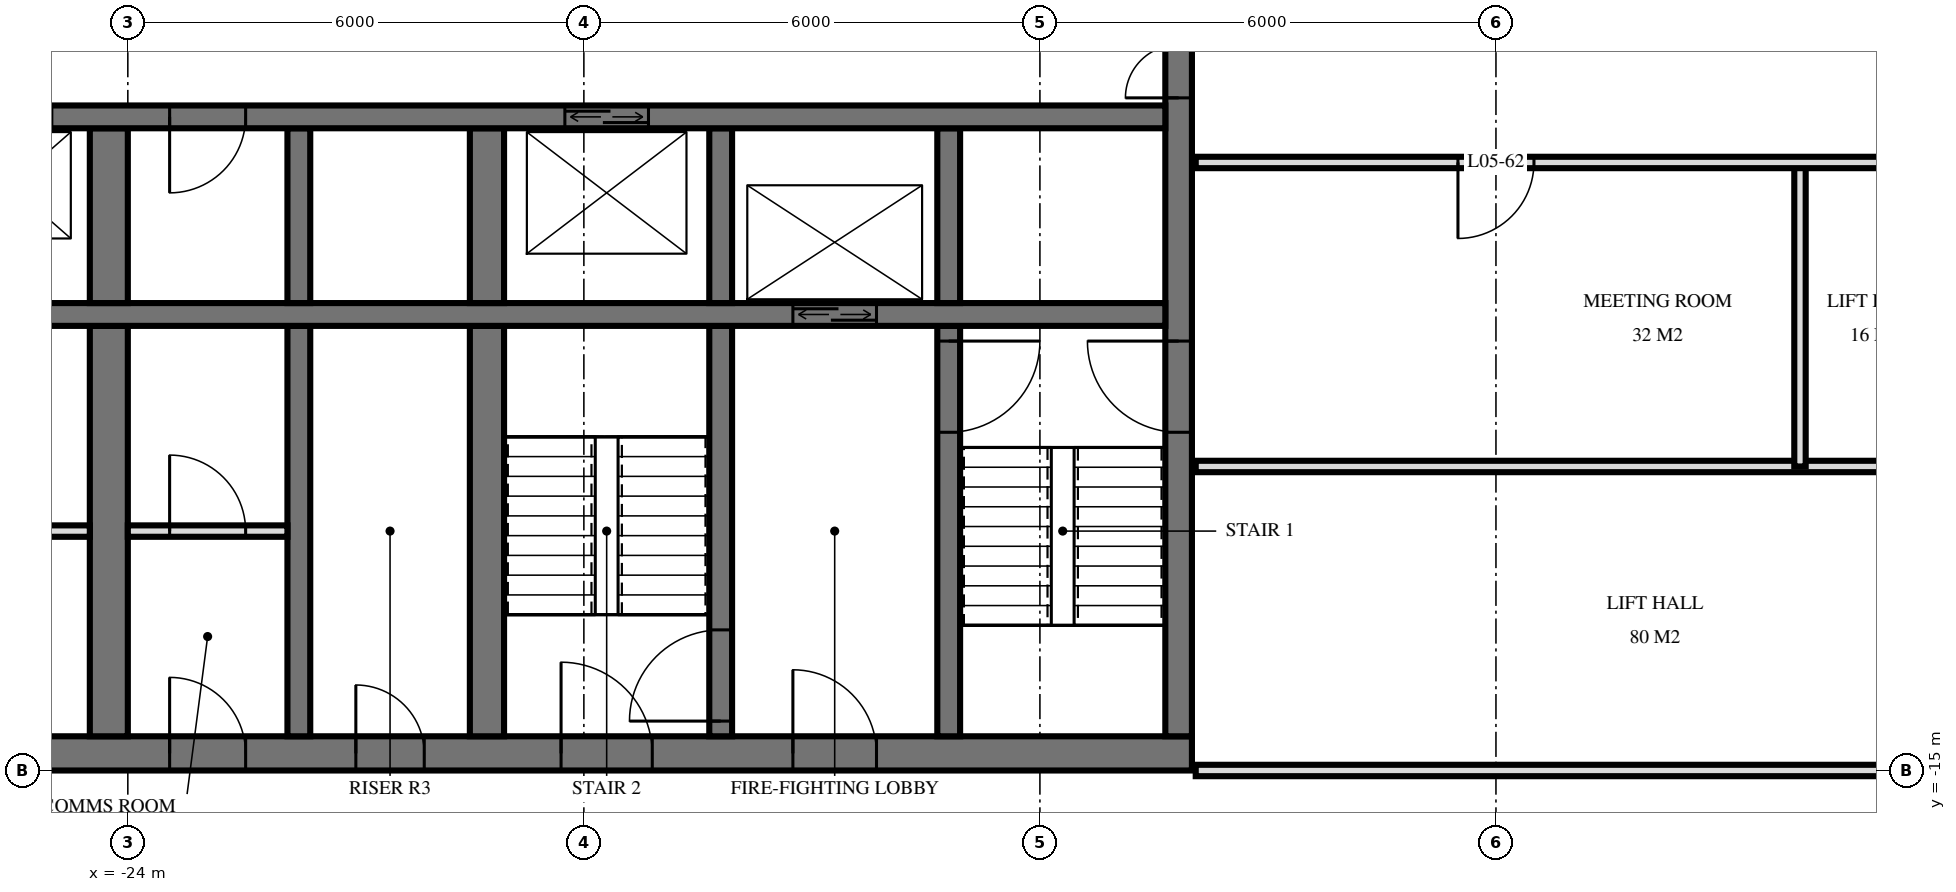
"""IFC4 building model, lengths in metres.
Left out: names, types, materials, properties, quantities, classifications, styles, units other than length and angle.
Written with IfcOpenShell. Run it as: python <this file> out.ifc"""

import sys

from ifc_helpers import new_model, si_unit, direction, frame, frame_2d, origin, place, context, subcontext, project, spatial, rectangle, extrude, element, fill, save


model = new_model("IFC4")
c1 = context("Model", 3, precision=1e-05, world=origin(), true_north=direction((0.0, 1.0)))
c2 = subcontext(c1, "Body", "Model", "MODEL_VIEW")
j1 = project(units=[si_unit("LENGTHUNIT", "METRE"), si_unit("PLANEANGLEUNIT", "RADIAN")], contexts=[c1])
p1 = place(None, origin())
s1 = spatial("IfcSite", under=j1, at=p1, CompositionType="ELEMENT")
p2 = place(p1, origin())
s2 = spatial("IfcBuilding", under=s1, at=p2, CompositionType="ELEMENT")
p3 = place(p2, frame((0.0, 0.0, 27.6)))
s3 = spatial("IfcBuildingStorey", under=s2, at=p3, CompositionType="ELEMENT", Elevation=27.6)
p4 = place(p3, frame((-29.5, -14.775, 0.0), z_axis=(0.0, 0.0, 1.0), x_axis=(1.0, 0.0, 0.0)))
e1 = element("IfcWall", 1, at=p4, inside=s3, PredefinedType="SHEAR", context=c2, shape_type="SweptSolid", body=[
    extrude(rectangle(XDim=19.5, YDim=0.45, at=frame_2d((9.75, 0.0))), origin(), (0.0, 0.0, 1.0), 3.6),
])
p5 = place(p4, frame((11.2, 0.0, 0.0)))
e2 = element("IfcOpeningElement", 2, at=p5, cuts=e1, PredefinedType="OPENING", context=c2, shape_type="SweptSolid", body=[
    extrude(rectangle(XDim=1.2, YDim=2.1, at=frame_2d((0.6, 1.05))), frame((0.0, 0.235, 0.0), z_axis=(0.0, -1.0, 0.0), x_axis=(1.0, 0.0, 0.0)), (0.0, 0.0, 1.0), 0.47),
])
p6 = place(p4, frame((14.25, 0.0, 0.0)))
e3 = element("IfcOpeningElement", 3, at=p6, cuts=e1, PredefinedType="OPENING", context=c2, shape_type="SweptSolid", body=[
    extrude(rectangle(XDim=1.1, YDim=2.1, at=frame_2d((0.55, 1.05))), frame((0.0, 0.235, 0.0), z_axis=(0.0, -1.0, 0.0), x_axis=(1.0, 0.0, 0.0)), (0.0, 0.0, 1.0), 0.47),
])
p7 = place(p4, frame((8.5, 0.0, 0.0)))
e4 = element("IfcOpeningElement", 4, at=p7, cuts=e1, PredefinedType="OPENING", context=c2, shape_type="SweptSolid", body=[
    extrude(rectangle(XDim=0.9, YDim=2.1, at=frame_2d((0.45, 1.05))), frame((0.0, 0.235, 0.0), z_axis=(0.0, -1.0, 0.0), x_axis=(1.0, 0.0, 0.0)), (0.0, 0.0, 1.0), 0.47),
])
p8 = place(p4, frame((6.05, 0.0, 0.0)))
e5 = element("IfcOpeningElement", 5, at=p8, cuts=e1, PredefinedType="OPENING", context=c2, shape_type="SweptSolid", body=[
    extrude(rectangle(XDim=1.0, YDim=2.1, at=frame_2d((0.5, 1.05))), frame((0.0, 0.235, 0.0), z_axis=(0.0, -1.0, 0.0), x_axis=(1.0, 0.0, 0.0)), (0.0, 0.0, 1.0), 0.47),
])
p9 = place(p4, frame((2.25, 0.0, 0.0)))
e6 = element("IfcOpeningElement", 6, at=p9, cuts=e1, PredefinedType="OPENING", context=c2, shape_type="SweptSolid", body=[
    extrude(rectangle(XDim=1.0, YDim=2.1, at=frame_2d((0.5, 1.05))), frame((0.0, 0.235, 0.0), z_axis=(0.0, -1.0, 0.0), x_axis=(1.0, 0.0, 0.0)), (0.0, 0.0, 1.0), 0.47),
])
p10 = place(p3, frame((-10.175, -14.55, 0.0), z_axis=(0.0, 0.0, 1.0), x_axis=(0.0, 1.0, 0.0)))
e7 = element("IfcWall", 7, at=p10, inside=s3, PredefinedType="SHEAR", context=c2, shape_type="SweptSolid", body=[
    extrude(rectangle(XDim=14.1, YDim=0.35, at=frame_2d((7.05, 0.0))), origin(), (0.0, 0.0, 1.0), 3.6),
])
p11 = place(p10, frame((8.4, 0.0, 0.0)))
e8 = element("IfcOpeningElement", 8, at=p11, cuts=e7, PredefinedType="OPENING", context=c2, shape_type="SweptSolid", body=[
    extrude(rectangle(XDim=1.4, YDim=2.4, at=frame_2d((0.7, 1.2))), frame((0.0, 0.185, 0.0), z_axis=(0.0, -1.0, 0.0), x_axis=(1.0, 0.0, 0.0)), (0.0, 0.0, 1.0), 0.37),
])
p12 = place(p10, frame((10.0, 0.0, 0.0)))
e9 = element("IfcOpeningElement", 9, at=p12, cuts=e7, PredefinedType="OPENING", context=c2, shape_type="SweptSolid", body=[
    extrude(rectangle(XDim=1.4, YDim=2.4, at=frame_2d((0.7, 1.2))), frame((0.0, 0.185, 0.0), z_axis=(0.0, -1.0, 0.0), x_axis=(1.0, 0.0, 0.0)), (0.0, 0.0, 1.0), 0.37),
])
p13 = place(p10, frame((4.0, 0.0, 0.0)))
e10 = element("IfcOpeningElement", 10, at=p13, cuts=e7, PredefinedType="OPENING", context=c2, shape_type="SweptSolid", body=[
    extrude(rectangle(XDim=1.2, YDim=2.1, at=frame_2d((0.6, 1.05))), frame((0.0, 0.185, 0.0), z_axis=(0.0, -1.0, 0.0), x_axis=(1.0, 0.0, 0.0)), (0.0, 0.0, 1.0), 0.37),
])
p14 = place(p3, frame((-29.05, -6.4, 0.0), z_axis=(0.0, 0.0, 1.0), x_axis=(1.0, 0.0, 0.0)))
e11 = element("IfcWall", 11, at=p14, inside=s3, PredefinedType="SHEAR", context=c2, shape_type="SweptSolid", body=[
    extrude(rectangle(XDim=18.7, YDim=0.3, at=frame_2d((9.35, 0.0))), origin(), (0.0, 0.0, 1.0), 3.6),
])
p15 = place(p14, frame((2.95, 0.0, 0.0)))
e12 = element("IfcOpeningElement", 12, at=p15, cuts=e11, PredefinedType="OPENING", context=c2, shape_type="SweptSolid", body=[
    extrude(rectangle(XDim=1.1, YDim=2.1, at=frame_2d((0.55, 1.05))), frame((0.0, 0.16, 0.0), z_axis=(0.0, -1.0, 0.0), x_axis=(1.0, 0.0, 0.0)), (0.0, 0.0, 1.0), 0.32),
])
p16 = place(p14, frame((0.55, 0.0, 0.0)))
e13 = element("IfcOpeningElement", 13, at=p16, cuts=e11, PredefinedType="OPENING", context=c2, shape_type="SweptSolid", body=[
    extrude(rectangle(XDim=1.1, YDim=2.1, at=frame_2d((0.55, 1.05))), frame((0.0, 0.16, 0.0), z_axis=(0.0, -1.0, 0.0), x_axis=(1.0, 0.0, 0.0)), (0.0, 0.0, 1.0), 0.32),
])
p17 = place(p14, frame((10.8, 0.0, 0.0)))
e14 = element("IfcOpeningElement", 14, at=p17, cuts=e11, PredefinedType="OPENING", context=c2, shape_type="SweptSolid", body=[
    extrude(rectangle(XDim=1.1, YDim=2.1, at=frame_2d((0.55, 1.05))), frame((0.0, 0.16, 0.0), z_axis=(0.0, -1.0, 0.0), x_axis=(1.0, 0.0, 0.0)), (0.0, 0.0, 1.0), 0.32),
])
p18 = place(p14, frame((5.6, 0.0, 0.0)))
e15 = element("IfcOpeningElement", 15, at=p18, cuts=e11, PredefinedType="OPENING", context=c2, shape_type="SweptSolid", body=[
    extrude(rectangle(XDim=1.0, YDim=2.1, at=frame_2d((0.5, 1.05))), frame((0.0, 0.16, 0.0), z_axis=(0.0, -1.0, 0.0), x_axis=(1.0, 0.0, 0.0)), (0.0, 0.0, 1.0), 0.32),
])
p19 = place(p3, frame((-29.05, -9.0, 0.0), z_axis=(0.0, 0.0, 1.0), x_axis=(1.0, 0.0, 0.0)))
e16 = element("IfcWall", 16, at=p19, inside=s3, PredefinedType="SHEAR", context=c2, shape_type="SweptSolid", body=[
    extrude(rectangle(XDim=18.7, YDim=0.3, at=frame_2d((9.35, 0.0))), origin(), (0.0, 0.0, 1.0), 3.6),
])
p20 = place(p19, frame((13.8, 0.0, 0.0)))
e17 = element("IfcOpeningElement", 17, at=p20, cuts=e16, PredefinedType="OPENING", context=c2, shape_type="SweptSolid", body=[
    extrude(rectangle(XDim=1.1, YDim=2.1, at=frame_2d((0.55, 1.05))), frame((0.0, 0.16, 0.0), z_axis=(0.0, -1.0, 0.0), x_axis=(1.0, 0.0, 0.0)), (0.0, 0.0, 1.0), 0.32),
])
p21 = place(p3, frame((-13.2, -8.85, 0.0), z_axis=(0.0, 0.0, 1.0), x_axis=(0.0, 1.0, 0.0)))
e18 = element("IfcWall", 18, at=p21, inside=s3, PredefinedType="SHEAR", context=c2, shape_type="SweptSolid", body=[
    extrude(rectangle(XDim=2.3, YDim=0.3, at=frame_2d((1.15, 0.0))), origin(), (0.0, 0.0, 1.0), 3.6),
])
p22 = place(p3, frame((-13.2, -14.55, 0.0), z_axis=(0.0, 0.0, 1.0), x_axis=(0.0, 1.0, 0.0)))
e19 = element("IfcWall", 19, at=p22, inside=s3, PredefinedType="SHEAR", context=c2, shape_type="SweptSolid", body=[
    extrude(rectangle(XDim=5.4, YDim=0.3, at=frame_2d((2.7, 0.0))), origin(), (0.0, 0.0, 1.0), 3.6),
])
p23 = place(p22, frame((4.0, 0.0, 0.0)))
e20 = element("IfcOpeningElement", 20, at=p23, cuts=e19, PredefinedType="OPENING", context=c2, shape_type="SweptSolid", body=[
    extrude(rectangle(XDim=1.2, YDim=2.1, at=frame_2d((0.6, 1.05))), frame((0.0, 0.16, 0.0), z_axis=(0.0, -1.0, 0.0), x_axis=(1.0, 0.0, 0.0)), (0.0, 0.0, 1.0), 0.32),
])
p24 = place(p3, frame((-16.2, -8.85, 0.0), z_axis=(0.0, 0.0, 1.0), x_axis=(0.0, 1.0, 0.0)))
e21 = element("IfcWall", 21, at=p24, inside=s3, PredefinedType="SHEAR", context=c2, shape_type="SweptSolid", body=[
    extrude(rectangle(XDim=2.3, YDim=0.3, at=frame_2d((1.15, 0.0))), origin(), (0.0, 0.0, 1.0), 3.6),
])
p25 = place(p3, frame((-16.2, -14.55, 0.0), z_axis=(0.0, 0.0, 1.0), x_axis=(0.0, 1.0, 0.0)))
e22 = element("IfcWall", 22, at=p25, inside=s3, PredefinedType="SHEAR", context=c2, shape_type="SweptSolid", body=[
    extrude(rectangle(XDim=5.4, YDim=0.3, at=frame_2d((2.7, 0.0))), origin(), (0.0, 0.0, 1.0), 3.6),
])
p26 = place(p25, frame((0.2, 0.0, 0.0)))
e23 = element("IfcOpeningElement", 23, at=p26, cuts=e22, PredefinedType="OPENING", context=c2, shape_type="SweptSolid", body=[
    extrude(rectangle(XDim=1.2, YDim=2.1, at=frame_2d((0.6, 1.05))), frame((0.0, 0.16, 0.0), z_axis=(0.0, -1.0, 0.0), x_axis=(1.0, 0.0, 0.0)), (0.0, 0.0, 1.0), 0.32),
])
p27 = place(p3, frame((-19.275, -8.85, 0.0), z_axis=(0.0, 0.0, 1.0), x_axis=(0.0, 1.0, 0.0)))
e24 = element("IfcWall", 24, at=p27, inside=s3, PredefinedType="SHEAR", context=c2, shape_type="SweptSolid", body=[
    extrude(rectangle(XDim=2.3, YDim=0.45, at=frame_2d((1.15, 0.0))), origin(), (0.0, 0.0, 1.0), 3.6),
])
p28 = place(p3, frame((-19.275, -14.55, 0.0), z_axis=(0.0, 0.0, 1.0), x_axis=(0.0, 1.0, 0.0)))
e25 = element("IfcWall", 25, at=p28, inside=s3, PredefinedType="SHEAR", context=c2, shape_type="SweptSolid", body=[
    extrude(rectangle(XDim=5.4, YDim=0.45, at=frame_2d((2.7, 0.0))), origin(), (0.0, 0.0, 1.0), 3.6),
])
p29 = place(p3, frame((-21.75, -8.85, 0.0), z_axis=(0.0, 0.0, 1.0), x_axis=(0.0, 1.0, 0.0)))
e26 = element("IfcWall", 26, at=p29, inside=s3, PredefinedType="SHEAR", context=c2, shape_type="SweptSolid", body=[
    extrude(rectangle(XDim=2.3, YDim=0.3, at=frame_2d((1.15, 0.0))), origin(), (0.0, 0.0, 1.0), 3.6),
])
p30 = place(p3, frame((-21.75, -14.55, 0.0), z_axis=(0.0, 0.0, 1.0), x_axis=(0.0, 1.0, 0.0)))
e27 = element("IfcWall", 27, at=p30, inside=s3, PredefinedType="SHEAR", context=c2, shape_type="SweptSolid", body=[
    extrude(rectangle(XDim=5.4, YDim=0.3, at=frame_2d((2.7, 0.0))), origin(), (0.0, 0.0, 1.0), 3.6),
])
p31 = place(p3, frame((-24.25, -8.85, 0.0), z_axis=(0.0, 0.0, 1.0), x_axis=(0.0, 1.0, 0.0)))
e28 = element("IfcWall", 28, at=p31, inside=s3, PredefinedType="SHEAR", context=c2, shape_type="SweptSolid", body=[
    extrude(rectangle(XDim=2.3, YDim=0.5, at=frame_2d((1.15, 0.0))), origin(), (0.0, 0.0, 1.0), 3.6),
])
p32 = place(p3, frame((-24.25, -14.55, 0.0), z_axis=(0.0, 0.0, 1.0), x_axis=(0.0, 1.0, 0.0)))
e29 = element("IfcWall", 29, at=p32, inside=s3, PredefinedType="SHEAR", context=c2, shape_type="SweptSolid", body=[
    extrude(rectangle(XDim=5.4, YDim=0.5, at=frame_2d((2.7, 0.0))), origin(), (0.0, 0.0, 1.0), 3.6),
])
p33 = place(p3, frame((-24.0, -11.85, 0.0), z_axis=(0.0, 0.0, 1.0), x_axis=(1.0, 0.0, 0.0)))
e30 = element("IfcWall", 30, at=p33, inside=s3, PredefinedType="PARTITIONING", context=c2, shape_type="SweptSolid", body=[
    extrude(rectangle(XDim=2.1, YDim=0.15, at=frame_2d((1.05, 0.0))), origin(), (0.0, 0.0, 1.0), 3.3),
])
p34 = place(p33, frame((0.55, 0.0, 0.0)))
e31 = element("IfcOpeningElement", 31, at=p34, cuts=e30, PredefinedType="OPENING", context=c2, shape_type="SweptSolid", body=[
    extrude(rectangle(XDim=1.0, YDim=2.1, at=frame_2d((0.5, 1.05))), frame((0.0, 0.085, 0.0), z_axis=(0.0, -1.0, 0.0), x_axis=(1.0, 0.0, 0.0)), (0.0, 0.0, 1.0), 0.17),
])
p35 = place(p3, frame((-29.0, -11.85, 0.0), z_axis=(0.0, 0.0, 1.0), x_axis=(1.0, 0.0, 0.0)))
e32 = element("IfcWall", 32, at=p35, inside=s3, PredefinedType="PARTITIONING", context=c2, shape_type="SweptSolid", body=[
    extrude(rectangle(XDim=4.5, YDim=0.15, at=frame_2d((2.25, 0.0))), origin(), (0.0, 0.0, 1.0), 3.3),
])
p36 = place(p35, frame((1.75, 0.0, 0.0)))
e33 = element("IfcOpeningElement", 33, at=p36, cuts=e32, PredefinedType="OPENING", context=c2, shape_type="SweptSolid", body=[
    extrude(rectangle(XDim=1.0, YDim=2.1, at=frame_2d((0.5, 1.05))), frame((0.0, 0.085, 0.0), z_axis=(0.0, -1.0, 0.0), x_axis=(1.0, 0.0, 0.0)), (0.0, 0.0, 1.0), 0.17),
])
p37 = place(p3, frame((-2.0, -11.0, 0.0), z_axis=(0.0, 0.0, 1.0), x_axis=(0.0, 1.0, 0.0)))
e34 = element("IfcWall", 34, at=p37, inside=s3, PredefinedType="PARTITIONING", context=c2, shape_type="SweptSolid", body=[
    extrude(rectangle(XDim=4.0, YDim=0.15, at=frame_2d((2.0, 0.0))), origin(), (0.0, 0.0, 1.0), 3.32),
])
p38 = place(p3, frame((-9.95, -15.0, 0.0), z_axis=(0.0, 0.0, 1.0), x_axis=(1.0, 0.0, 0.0)))
e35 = element("IfcWall", 35, at=p38, inside=s3, PredefinedType="PARTITIONING", context=c2, shape_type="SweptSolid", body=[
    extrude(rectangle(XDim=19.9, YDim=0.15, at=frame_2d((9.95, 0.0))), origin(), (0.0, 0.0, 1.0), 2.684),
])
p39 = place(p38, frame((9.45, 0.0, 0.0)))
e36 = element("IfcOpeningElement", 36, at=p39, cuts=e35, PredefinedType="OPENING", context=c2, shape_type="SweptSolid", body=[
    extrude(rectangle(XDim=1.0, YDim=2.1, at=frame_2d((0.5, 1.05))), frame((0.0, 0.085, 0.0), z_axis=(0.0, -1.0, 0.0), x_axis=(1.0, 0.0, 0.0)), (0.0, 0.0, 1.0), 0.17),
])
p40 = place(p3, frame((-9.95, -11.0, 0.0), z_axis=(0.0, 0.0, 1.0), x_axis=(1.0, 0.0, 0.0)))
e37 = element("IfcWall", 37, at=p40, inside=s3, PredefinedType="PARTITIONING", context=c2, shape_type="SweptSolid", body=[
    extrude(rectangle(XDim=19.9, YDim=0.15, at=frame_2d((9.95, 0.0))), origin(), (0.0, 0.0, 1.0), 3.32),
])
p41 = place(p40, frame((9.45, 0.0, 0.0)))
e38 = element("IfcOpeningElement", 38, at=p41, cuts=e37, PredefinedType="OPENING", context=c2, shape_type="SweptSolid", body=[
    extrude(rectangle(XDim=1.0, YDim=2.1, at=frame_2d((0.5, 1.05))), frame((0.0, 0.085, 0.0), z_axis=(0.0, -1.0, 0.0), x_axis=(1.0, 0.0, 0.0)), (0.0, 0.0, 1.0), 0.17),
])
p42 = place(p40, frame((15.45, 0.0, 0.0)))
e39 = element("IfcOpeningElement", 39, at=p42, cuts=e37, PredefinedType="OPENING", context=c2, shape_type="SweptSolid", body=[
    extrude(rectangle(XDim=1.0, YDim=2.1, at=frame_2d((0.5, 1.05))), frame((0.0, 0.085, 0.0), z_axis=(0.0, -1.0, 0.0), x_axis=(1.0, 0.0, 0.0)), (0.0, 0.0, 1.0), 0.17),
])
p43 = place(p3, frame((-9.95, -7.0, 0.0), z_axis=(0.0, 0.0, 1.0), x_axis=(1.0, 0.0, 0.0)))
e40 = element("IfcWall", 40, at=p43, inside=s3, PredefinedType="PARTITIONING", context=c2, shape_type="SweptSolid", body=[
    extrude(rectangle(XDim=19.9, YDim=0.15, at=frame_2d((9.95, 0.0))), origin(), (0.0, 0.0, 1.0), 3.32),
])
p44 = place(p43, frame((9.45, 0.0, 0.0)))
e41 = element("IfcOpeningElement", 41, at=p44, cuts=e40, PredefinedType="OPENING", context=c2, shape_type="SweptSolid", body=[
    extrude(rectangle(XDim=1.0, YDim=2.1, at=frame_2d((0.5, 1.05))), frame((0.0, 0.085, 0.0), z_axis=(0.0, -1.0, 0.0), x_axis=(1.0, 0.0, 0.0)), (0.0, 0.0, 1.0), 0.17),
])
p45 = place(p43, frame((3.45, 0.0, 0.0)))
e42 = element("IfcOpeningElement", 42, at=p45, cuts=e40, PredefinedType="OPENING", context=c2, shape_type="SweptSolid", body=[
    extrude(rectangle(XDim=1.0, YDim=2.1, at=frame_2d((0.5, 1.05))), frame((0.0, 0.085, 0.0), z_axis=(0.0, -1.0, 0.0), x_axis=(1.0, 0.0, 0.0)), (0.0, 0.0, 1.0), 0.17),
])
p46 = place(p20, origin())
e43 = element("IfcDoor", 43, at=p46, inside=s3, OperationType="DOUBLE_DOOR_SLIDING", PredefinedType="USERDEFINED", context=c2, shape_type="SweptSolid", body=[
    extrude(rectangle(XDim=1.1, YDim=2.1, at=frame_2d((0.55, 1.05))), frame((0.0, 0.025, 0.0), z_axis=(0.0, -1.0, 0.0), x_axis=(1.0, 0.0, 0.0)), (0.0, 0.0, 1.0), 0.05),
])
fill(e17, e43)
p47 = place(p17, origin())
e44 = element("IfcDoor", 44, at=p47, inside=s3, OperationType="DOUBLE_DOOR_SLIDING", PredefinedType="USERDEFINED", context=c2, shape_type="SweptSolid", body=[
    extrude(rectangle(XDim=1.1, YDim=2.1, at=frame_2d((0.55, 1.05))), frame((0.0, 0.025, 0.0), z_axis=(0.0, -1.0, 0.0), x_axis=(1.0, 0.0, 0.0)), (0.0, 0.0, 1.0), 0.05),
])
fill(e14, e44)
p48 = place(p11, origin())
e45 = element("IfcDoor", 45, at=p48, inside=s3, OperationType="DOUBLE_DOOR_SINGLE_SWING", PredefinedType="DOOR", context=c2, shape_type="SweptSolid", body=[
    extrude(rectangle(XDim=1.4, YDim=2.4, at=frame_2d((0.7, 1.2))), frame((0.0, 0.025, 0.0), z_axis=(0.0, -1.0, 0.0), x_axis=(1.0, 0.0, 0.0)), (0.0, 0.0, 1.0), 0.05),
])
fill(e8, e45)
p49 = place(p13, origin())
e46 = element("IfcDoor", 46, at=p49, inside=s3, OperationType="SINGLE_SWING_LEFT", PredefinedType="DOOR", context=c2, shape_type="SweptSolid", body=[
    extrude(rectangle(XDim=1.2, YDim=2.1, at=frame_2d((0.6, 1.05))), frame((0.0, 0.025, 0.0), z_axis=(0.0, -1.0, 0.0), x_axis=(1.0, 0.0, 0.0)), (0.0, 0.0, 1.0), 0.05),
])
fill(e10, e46)
p50 = place(p5, origin())
e47 = element("IfcDoor", 47, at=p50, inside=s3, OperationType="SINGLE_SWING_RIGHT", PredefinedType="DOOR", context=c2, shape_type="SweptSolid", body=[
    extrude(rectangle(XDim=1.2, YDim=2.1, at=frame_2d((0.6, 1.05))), frame((0.0, 0.025, 0.0), z_axis=(0.0, -1.0, 0.0), x_axis=(1.0, 0.0, 0.0)), (0.0, 0.0, 1.0), 0.05),
])
fill(e2, e47)
p51 = place(p6, origin())
e48 = element("IfcDoor", 48, at=p51, inside=s3, OperationType="SINGLE_SWING_RIGHT", PredefinedType="DOOR", context=c2, shape_type="SweptSolid", body=[
    extrude(rectangle(XDim=1.1, YDim=2.1, at=frame_2d((0.55, 1.05))), frame((0.0, 0.025, 0.0), z_axis=(0.0, -1.0, 0.0), x_axis=(1.0, 0.0, 0.0)), (0.0, 0.0, 1.0), 0.05),
])
fill(e3, e48)
p52 = place(p7, origin())
e49 = element("IfcDoor", 49, at=p52, inside=s3, OperationType="SINGLE_SWING_RIGHT", PredefinedType="DOOR", context=c2, shape_type="SweptSolid", body=[
    extrude(rectangle(XDim=0.9, YDim=2.1, at=frame_2d((0.45, 1.05))), frame((0.0, 0.025, 0.0), z_axis=(0.0, -1.0, 0.0), x_axis=(1.0, 0.0, 0.0)), (0.0, 0.0, 1.0), 0.05),
])
fill(e4, e49)
p53 = place(p8, origin())
e50 = element("IfcDoor", 50, at=p53, inside=s3, OperationType="SINGLE_SWING_RIGHT", PredefinedType="DOOR", context=c2, shape_type="SweptSolid", body=[
    extrude(rectangle(XDim=1.0, YDim=2.1, at=frame_2d((0.5, 1.05))), frame((0.0, 0.025, 0.0), z_axis=(0.0, -1.0, 0.0), x_axis=(1.0, 0.0, 0.0)), (0.0, 0.0, 1.0), 0.05),
])
fill(e5, e50)
p54 = place(p18, frame((0.5, 0.0, 0.0), z_axis=(0.0, 0.0, 1.0), x_axis=(-1.0, 0.0, 0.0)))
e51 = element("IfcDoor", 51, at=p54, inside=s3, OperationType="SINGLE_SWING_LEFT", PredefinedType="DOOR", context=c2, shape_type="SweptSolid", body=[
    extrude(rectangle(XDim=1.0, YDim=2.1, at=frame_2d((0.0, 1.05))), frame((0.0, -0.025, 0.0), z_axis=(0.0, 1.0, 0.0), x_axis=(-1.0, 0.0, 0.0)), (0.0, 0.0, 1.0), 0.05),
])
fill(e15, e51)
p55 = place(p23, frame((0.6, 0.0, 0.0), z_axis=(0.0, 0.0, 1.0), x_axis=(-1.0, 0.0, 0.0)))
e52 = element("IfcDoor", 52, at=p55, inside=s3, OperationType="SINGLE_SWING_RIGHT", PredefinedType="DOOR", context=c2, shape_type="SweptSolid", body=[
    extrude(rectangle(XDim=1.2, YDim=2.1, at=frame_2d((0.0, 1.05))), frame((0.0, -0.025, 0.0), z_axis=(0.0, 1.0, 0.0), x_axis=(-1.0, 0.0, 0.0)), (0.0, 0.0, 1.0), 0.05),
])
fill(e20, e52)
p56 = place(p26, origin())
e53 = element("IfcDoor", 53, at=p56, inside=s3, OperationType="SINGLE_SWING_RIGHT", PredefinedType="DOOR", context=c2, shape_type="SweptSolid", body=[
    extrude(rectangle(XDim=1.2, YDim=2.1, at=frame_2d((0.6, 1.05))), frame((0.0, 0.025, 0.0), z_axis=(0.0, -1.0, 0.0), x_axis=(1.0, 0.0, 0.0)), (0.0, 0.0, 1.0), 0.05),
])
fill(e23, e53)
p57 = place(p34, origin())
e54 = element("IfcDoor", 54, at=p57, inside=s3, OperationType="SINGLE_SWING_RIGHT", PredefinedType="DOOR", context=c2, shape_type="SweptSolid", body=[
    extrude(rectangle(XDim=1.0, YDim=2.1, at=frame_2d((0.5, 1.05))), frame((0.0, 0.025, 0.0), z_axis=(0.0, -1.0, 0.0), x_axis=(1.0, 0.0, 0.0)), (0.0, 0.0, 1.0), 0.05),
])
fill(e31, e54)
p58 = place(p45, frame((0.5, 0.0, 0.0), z_axis=(0.0, 0.0, 1.0), x_axis=(-1.0, 0.0, 0.0)))
e55 = element("IfcDoor", 55, at=p58, inside=s3, OperationType="SINGLE_SWING_LEFT", PredefinedType="DOOR", context=c2, shape_type="SweptSolid", body=[
    extrude(rectangle(XDim=1.0, YDim=2.1, at=frame_2d((0.0, 1.05))), frame((0.0, -0.025, 0.0), z_axis=(0.0, 1.0, 0.0), x_axis=(-1.0, 0.0, 0.0)), (0.0, 0.0, 1.0), 0.05),
])
fill(e42, e55)
save(model, sys.argv[1])
